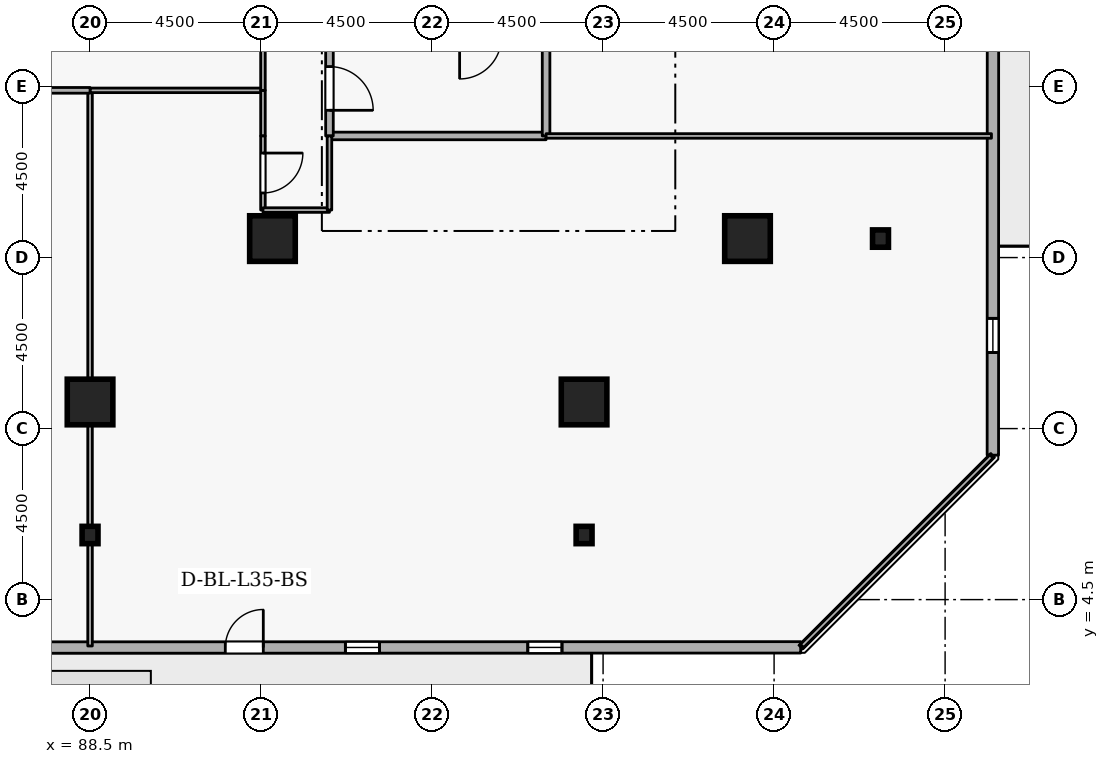
"""IFC4 building model, lengths in metres.
Left out: names, types, materials, properties, quantities, classifications, styles, units other than length and angle.
Written with IfcOpenShell. Run it as: python <this file> out.ifc"""

import sys

from ifc_helpers import new_model, si_unit, direction, frame, frame_2d, origin, origin_2d, place, context, subcontext, project, spatial, rectangle, i_section, extrude, element, fill, save


model = new_model("IFC4")
c1 = context("Model", 3, precision=1e-05, world=origin(), true_north=direction((0.0, 1.0)))
c2 = subcontext(c1, "Body", "Model", "MODEL_VIEW")
j1 = project(units=[si_unit("LENGTHUNIT", "METRE"), si_unit("PLANEANGLEUNIT", "RADIAN")], contexts=[c1])
p1 = place(None, origin())
s1 = spatial("IfcSite", under=j1, at=p1, CompositionType="ELEMENT")
p2 = place(p1, origin())
s2 = spatial("IfcBuilding", under=s1, at=p2, CompositionType="ELEMENT")
p3 = place(p2, frame((0.0, 0.0, 134.1)))
s3 = spatial("IfcBuildingStorey", under=s2, at=p3, CompositionType="ELEMENT", Elevation=134.1)
for number, where, z_axis, x_axis in (
    (1, (105.8, 14.0, 0.0), (0.0, 0.0, 1.0), (1.0, 0.0, 0.0)),
    (2, (101.5, 9.7, 0.0), (0.0, 0.0, 1.0), (1.0, 0.0, 0.0)),
    (3, (88.5, 9.7, 0.0), (0.0, 0.0, 1.0), (1.0, 0.0, 0.0)),
    (4, (93.3, 14.0, 0.0), (0.0, 0.0, 1.0), (1.0, 0.0, 0.0)),
):
    element("IfcColumn", number, at=place(p3, frame(where, z_axis=z_axis, x_axis=x_axis)), inside=s3, PredefinedType="COLUMN", context=c2, shape_type="SweptSolid", body=[
        extrude(rectangle(XDim=1.2, YDim=1.2, at=origin_2d()), origin(), (0.0, 0.0, 1.0), 3.6),
    ])
for number, where, z_axis, x_axis in (
    (5, (109.3, 14.0, 0.0), (0.0, 0.0, 1.0), (1.0, 0.0, 0.0)),
    (6, (101.5, 6.2, 0.0), (0.0, 0.0, 1.0), (1.0, 0.0, 0.0)),
    (7, (88.5, 6.2, 0.0), (0.0, 0.0, 1.0), (1.0, 0.0, 0.0)),
):
    element("IfcColumn", number, at=place(p3, frame(where, z_axis=z_axis, x_axis=x_axis)), inside=s3, PredefinedType="COLUMN", context=c2, shape_type="SweptSolid", body=[
        extrude(i_section(OverallWidth=0.418, OverallDepth=0.456, WebThickness=0.042, FlangeThickness=0.067, FilletRadius=0.015, at=origin_2d()), origin(), (0.0, 0.0, 1.0), 3.6),
    ])
p4 = place(p3, frame((73.319, 3.235, 0.0), z_axis=(0.0, 0.0, 1.0), x_axis=(0.999999969988, 0.000244999128, 0.0)))
e8 = element("IfcWall", 8, at=p4, inside=s3, PredefinedType="STANDARD", context=c2, shape_type="SweptSolid", body=[
    extrude(rectangle(XDim=33.881, YDim=0.3, at=frame_2d((16.94, 0.0))), origin(), (0.0, 0.0, 1.0), 2.7),
])
p5 = place(p4, frame((18.74, 0.0, 0.0)))
e9 = element("IfcOpeningElement", 9, at=p5, cuts=e8, PredefinedType="OPENING", context=c2, shape_type="SweptSolid", body=[
    extrude(rectangle(XDim=1.0, YDim=2.08, at=frame_2d((0.5, 1.04))), frame((0.0, 0.16, 0.0), z_axis=(0.0, -1.0, 0.0), x_axis=(1.0, 0.0, 0.0)), (0.0, 0.0, 1.0), 0.32),
])
p6 = place(p4, frame((2.7, 0.0, 0.72)))
e10 = element("IfcOpeningElement", 10, at=p6, cuts=e8, PredefinedType="OPENING", context=c2, shape_type="SweptSolid", body=[
    extrude(rectangle(XDim=0.9, YDim=1.75, at=frame_2d((0.45, 0.875))), frame((0.0, 0.16, 0.0), z_axis=(0.0, -1.0, 0.0), x_axis=(1.0, 0.0, 0.0)), (0.0, 0.0, 1.0), 0.32),
])
p7 = place(p4, frame((7.5, 0.0, 0.72)))
e11 = element("IfcOpeningElement", 11, at=p7, cuts=e8, PredefinedType="OPENING", context=c2, shape_type="SweptSolid", body=[
    extrude(rectangle(XDim=0.9, YDim=1.75, at=frame_2d((0.45, 0.875))), frame((0.0, 0.16, 0.0), z_axis=(0.0, -1.0, 0.0), x_axis=(1.0, 0.0, 0.0)), (0.0, 0.0, 1.0), 0.32),
])
p8 = place(p4, frame((12.3, 0.0, 0.72)))
e12 = element("IfcOpeningElement", 12, at=p8, cuts=e8, PredefinedType="OPENING", context=c2, shape_type="SweptSolid", body=[
    extrude(rectangle(XDim=0.9, YDim=1.75, at=frame_2d((0.45, 0.875))), frame((0.0, 0.16, 0.0), z_axis=(0.0, -1.0, 0.0), x_axis=(1.0, 0.0, 0.0)), (0.0, 0.0, 1.0), 0.32),
])
p9 = place(p4, frame((21.9, 0.0, 0.72)))
e13 = element("IfcOpeningElement", 13, at=p9, cuts=e8, PredefinedType="OPENING", context=c2, shape_type="SweptSolid", body=[
    extrude(rectangle(XDim=0.9, YDim=1.75, at=frame_2d((0.45, 0.875))), frame((0.0, 0.16, 0.0), z_axis=(0.0, -1.0, 0.0), x_axis=(1.0, 0.0, 0.0)), (0.0, 0.0, 1.0), 0.32),
])
p10 = place(p4, frame((26.7, 0.0, 0.72)))
e14 = element("IfcOpeningElement", 14, at=p10, cuts=e8, PredefinedType="OPENING", context=c2, shape_type="SweptSolid", body=[
    extrude(rectangle(XDim=0.9, YDim=1.75, at=frame_2d((0.45, 0.875))), frame((0.0, 0.16, 0.0), z_axis=(0.0, -1.0, 0.0), x_axis=(1.0, 0.0, 0.0)), (0.0, 0.0, 1.0), 0.32),
])
p11 = place(p3, frame((112.256, 8.301, 0.0), z_axis=(0.0, 0.0, 1.0), x_axis=(0.000244999128, 0.999999969988, 0.0)))
e15 = element("IfcWall", 15, at=p11, inside=s3, PredefinedType="STANDARD", context=c2, shape_type="SweptSolid", body=[
    extrude(rectangle(XDim=33.881, YDim=0.3, at=frame_2d((16.94, 0.0))), origin(), (0.0, 0.0, 1.0), 2.7),
])
p12 = place(p11, frame((26.84, 0.0, 0.0)))
e16 = element("IfcOpeningElement", 16, at=p12, cuts=e15, PredefinedType="OPENING", context=c2, shape_type="SweptSolid", body=[
    extrude(rectangle(XDim=1.0, YDim=2.08, at=frame_2d((0.5, 1.04))), frame((0.0, 0.16, 0.0), z_axis=(0.0, -1.0, 0.0), x_axis=(1.0, 0.0, 0.0)), (0.0, 0.0, 1.0), 0.32),
])
p13 = place(p11, frame((2.7, 0.0, 0.72)))
e17 = element("IfcOpeningElement", 17, at=p13, cuts=e15, PredefinedType="OPENING", context=c2, shape_type="SweptSolid", body=[
    extrude(rectangle(XDim=0.9, YDim=1.75, at=frame_2d((0.45, 0.875))), frame((0.0, 0.16, 0.0), z_axis=(0.0, -1.0, 0.0), x_axis=(1.0, 0.0, 0.0)), (0.0, 0.0, 1.0), 0.32),
])
p14 = place(p11, frame((12.3, 0.0, 0.72)))
e18 = element("IfcOpeningElement", 18, at=p14, cuts=e15, PredefinedType="OPENING", context=c2, shape_type="SweptSolid", body=[
    extrude(rectangle(XDim=0.9, YDim=1.75, at=frame_2d((0.45, 0.875))), frame((0.0, 0.16, 0.0), z_axis=(0.0, -1.0, 0.0), x_axis=(1.0, 0.0, 0.0)), (0.0, 0.0, 1.0), 0.32),
])
p15 = place(p11, frame((17.1, 0.0, 0.72)))
e19 = element("IfcOpeningElement", 19, at=p15, cuts=e15, PredefinedType="OPENING", context=c2, shape_type="SweptSolid", body=[
    extrude(rectangle(XDim=0.9, YDim=1.75, at=frame_2d((0.45, 0.875))), frame((0.0, 0.16, 0.0), z_axis=(0.0, -1.0, 0.0), x_axis=(1.0, 0.0, 0.0)), (0.0, 0.0, 1.0), 0.32),
])
p16 = place(p11, frame((21.9, 0.0, 0.72)))
e20 = element("IfcOpeningElement", 20, at=p16, cuts=e15, PredefinedType="OPENING", context=c2, shape_type="SweptSolid", body=[
    extrude(rectangle(XDim=0.9, YDim=1.75, at=frame_2d((0.45, 0.875))), frame((0.0, 0.16, 0.0), z_axis=(0.0, -1.0, 0.0), x_axis=(1.0, 0.0, 0.0)), (0.0, 0.0, 1.0), 0.32),
])
p17 = place(p3, frame((94.8, 16.7, 0.0), z_axis=(0.0, 0.0, 1.0), x_axis=(1.0, 0.0, 0.0)))
e21 = element("IfcWall", 21, at=p17, inside=s3, PredefinedType="STANDARD", context=c2, shape_type="SweptSolid", body=[
    extrude(rectangle(XDim=5.7, YDim=0.2, at=frame_2d((2.85, 0.0))), origin(), (0.0, 0.0, 1.0), 3.34),
])
p18 = place(p3, frame((100.5, 16.7, 0.0), z_axis=(0.0, 0.0, 1.0), x_axis=(0.0, 1.0, 0.0)))
e22 = element("IfcWall", 22, at=p18, inside=s3, PredefinedType="STANDARD", context=c2, shape_type="SweptSolid", body=[
    extrude(rectangle(XDim=2.5, YDim=0.2, at=frame_2d((1.25, 0.0))), origin(), (0.0, 0.0, 1.0), 3.34),
])
p19 = place(p3, frame((94.8, 19.2, 0.0), z_axis=(0.0, 0.0, 1.0), x_axis=(0.0, -1.0, 0.0)))
e23 = element("IfcWall", 23, at=p19, inside=s3, PredefinedType="STANDARD", context=c2, shape_type="SweptSolid", body=[
    extrude(rectangle(XDim=2.5, YDim=0.2, at=frame_2d((1.25, 0.0))), origin(), (0.0, 0.0, 1.0), 3.34),
])
p20 = place(p19, frame((0.675, 0.0, 0.0)))
e24 = element("IfcOpeningElement", 24, at=p20, cuts=e23, PredefinedType="OPENING", context=c2, shape_type="SweptSolid", body=[
    extrude(rectangle(XDim=1.15, YDim=2.1, at=frame_2d((0.575, 1.05))), frame((0.0, 0.11, 0.0), z_axis=(0.0, -1.0, 0.0), x_axis=(1.0, 0.0, 0.0)), (0.0, 0.0, 1.0), 0.22),
])
p21 = place(p3, frame((88.5, 3.28, 0.0), z_axis=(0.0, 0.0, 1.0), x_axis=(0.0, 1.0, 0.0)))
e25 = element("IfcWall", 25, at=p21, inside=s3, PredefinedType="PARTITIONING", context=c2, shape_type="SweptSolid", body=[
    extrude(rectangle(XDim=14.62, YDim=0.12, at=frame_2d((7.31, 0.0))), origin(), (0.0, 0.0, 1.0), 2.878),
])
p22 = place(p3, frame((88.5, 17.9, 0.0), z_axis=(0.0, 0.0, 1.0), x_axis=(1.0, 0.0, 0.0)))
e26 = element("IfcWall", 26, at=p22, inside=s3, PredefinedType="PARTITIONING", context=c2, shape_type="SweptSolid", body=[
    extrude(rectangle(XDim=4.55, YDim=0.12, at=frame_2d((2.275, 0.0))), origin(), (0.0, 0.0, 1.0), 3.34),
])
p23 = place(p3, frame((93.05, 17.9, 0.0), z_axis=(0.0, 0.0, 1.0), x_axis=(0.0, -1.0, 0.0)))
e27 = element("IfcWall", 27, at=p23, inside=s3, PredefinedType="PARTITIONING", context=c2, shape_type="SweptSolid", body=[
    extrude(rectangle(XDim=1.2, YDim=0.12, at=frame_2d((0.6, 0.0))), origin(), (0.0, 0.0, 1.0), 3.34),
])
p24 = place(p3, frame((93.05, 16.7, 0.0), z_axis=(0.0, 0.0, 1.0), x_axis=(0.0, -1.0, 0.0)))
e28 = element("IfcWall", 28, at=p24, inside=s3, PredefinedType="PARTITIONING", context=c2, shape_type="SweptSolid", body=[
    extrude(rectangle(XDim=1.95, YDim=0.12, at=frame_2d((0.975, 0.0))), origin(), (0.0, 0.0, 1.0), 3.34),
])
p25 = place(p24, frame((0.45, 0.0, 0.0)))
e29 = element("IfcOpeningElement", 29, at=p25, cuts=e28, PredefinedType="OPENING", context=c2, shape_type="SweptSolid", body=[
    extrude(rectangle(XDim=1.05, YDim=2.1, at=frame_2d((0.525, 1.05))), frame((0.0, 0.07, 0.0), z_axis=(0.0, -1.0, 0.0), x_axis=(1.0, 0.0, 0.0)), (0.0, 0.0, 1.0), 0.14),
])
p26 = place(p3, frame((93.05, 14.75, 0.0), z_axis=(0.0, 0.0, 1.0), x_axis=(1.0, 0.0, 0.0)))
e30 = element("IfcWall", 30, at=p26, inside=s3, PredefinedType="PARTITIONING", context=c2, shape_type="SweptSolid", body=[
    extrude(rectangle(XDim=1.75, YDim=0.12, at=frame_2d((0.875, 0.0))), origin(), (0.0, 0.0, 1.0), 3.34),
])
p27 = place(p3, frame((94.8, 14.75, 0.0), z_axis=(0.0, 0.0, 1.0), x_axis=(0.0, 1.0, 0.0)))
e31 = element("IfcWall", 31, at=p27, inside=s3, PredefinedType="PARTITIONING", context=c2, shape_type="SweptSolid", body=[
    extrude(rectangle(XDim=1.95, YDim=0.12, at=frame_2d((0.975, 0.0))), origin(), (0.0, 0.0, 1.0), 3.34),
])
p28 = place(p3, frame((100.5, 16.7, 0.0), z_axis=(0.0, 0.0, 1.0), x_axis=(1.0, 0.0, 0.0)))
e32 = element("IfcWall", 32, at=p28, inside=s3, PredefinedType="PARTITIONING", context=c2, shape_type="SweptSolid", body=[
    extrude(rectangle(XDim=11.72, YDim=0.12, at=frame_2d((5.86, 0.0))), origin(), (0.0, 0.0, 1.0), 3.34),
])
p29 = place(p3, frame((112.22, 8.267, 0.0), z_axis=(0.0, 0.0, 1.0), x_axis=(-0.707106781187, -0.707106781187, 0.0)))
e33 = element("IfcWall", 33, at=p29, inside=s3, PredefinedType="PARTITIONING", context=c2, shape_type="SweptSolid", body=[
    extrude(rectangle(XDim=7.052, YDim=0.12, at=frame_2d((3.526, 0.0))), origin(), (0.0, 0.0, 1.0), 3.34),
])
p30 = place(p3, frame((83.95, 17.9, 0.0), z_axis=(0.0, 0.0, 1.0), x_axis=(1.0, 0.0, 0.0)))
e34 = element("IfcWall", 34, at=p30, inside=s3, PredefinedType="PARTITIONING", context=c2, shape_type="SweptSolid", body=[
    extrude(rectangle(XDim=4.55, YDim=0.15, at=frame_2d((2.275, 0.0))), origin(), (0.0, 0.0, 1.0), 3.34),
])
p31 = place(p3, frame((93.05, 22.4, 0.0), z_axis=(0.0, 0.0, 1.0), x_axis=(0.0, -1.0, 0.0)))
e35 = element("IfcWall", 35, at=p31, inside=s3, PredefinedType="PARTITIONING", context=c2, shape_type="SweptSolid", body=[
    extrude(rectangle(XDim=4.5, YDim=0.12, at=frame_2d((2.25, 0.0))), origin(), (0.0, 0.0, 1.0), 3.34),
])
p32 = place(p5, origin())
e36 = element("IfcDoor", 36, at=p32, inside=s3, OperationType="SINGLE_SWING_RIGHT", PredefinedType="DOOR", context=c2, shape_type="SweptSolid", body=[
    extrude(rectangle(XDim=1.0, YDim=2.08, at=frame_2d((0.5, 1.04))), frame((0.0, 0.025, 0.0), z_axis=(0.0, -1.0, 0.0), x_axis=(1.0, 0.0, 0.0)), (0.0, 0.0, 1.0), 0.05),
])
fill(e9, e36)
p33 = place(p9, origin())
e37 = element("IfcWindow", 37, at=p33, inside=s3, PartitioningType="SINGLE_PANEL", PredefinedType="WINDOW", context=c2, shape_type="SweptSolid", body=[
    extrude(rectangle(XDim=0.9, YDim=1.75, at=frame_2d((0.45, 0.875))), frame((0.0, 0.03, 0.0), z_axis=(0.0, -1.0, 0.0), x_axis=(1.0, 0.0, 0.0)), (0.0, 0.0, 1.0), 0.06),
])
fill(e13, e37)
p34 = place(p10, origin())
e38 = element("IfcWindow", 38, at=p34, inside=s3, PartitioningType="SINGLE_PANEL", PredefinedType="WINDOW", context=c2, shape_type="SweptSolid", body=[
    extrude(rectangle(XDim=0.9, YDim=1.75, at=frame_2d((0.45, 0.875))), frame((0.0, 0.03, 0.0), z_axis=(0.0, -1.0, 0.0), x_axis=(1.0, 0.0, 0.0)), (0.0, 0.0, 1.0), 0.06),
])
fill(e14, e38)
p35 = place(p13, origin())
e39 = element("IfcWindow", 39, at=p35, inside=s3, PartitioningType="SINGLE_PANEL", PredefinedType="WINDOW", context=c2, shape_type="SweptSolid", body=[
    extrude(rectangle(XDim=0.9, YDim=1.75, at=frame_2d((0.45, 0.875))), frame((0.0, 0.03, 0.0), z_axis=(0.0, -1.0, 0.0), x_axis=(1.0, 0.0, 0.0)), (0.0, 0.0, 1.0), 0.06),
])
fill(e17, e39)
p36 = place(p20, origin())
e40 = element("IfcDoor", 40, at=p36, inside=s3, OperationType="SINGLE_SWING_RIGHT", PredefinedType="DOOR", context=c2, shape_type="SweptSolid", body=[
    extrude(rectangle(XDim=1.15, YDim=2.1, at=frame_2d((0.575, 1.05))), frame((0.0, 0.025, 0.0), z_axis=(0.0, -1.0, 0.0), x_axis=(1.0, 0.0, 0.0)), (0.0, 0.0, 1.0), 0.05),
])
fill(e24, e40)
p37 = place(p25, origin())
e41 = element("IfcDoor", 41, at=p37, inside=s3, OperationType="SINGLE_SWING_LEFT", PredefinedType="DOOR", context=c2, shape_type="SweptSolid", body=[
    extrude(rectangle(XDim=1.05, YDim=2.1, at=frame_2d((0.525, 1.05))), frame((0.0, 0.025, 0.0), z_axis=(0.0, -1.0, 0.0), x_axis=(1.0, 0.0, 0.0)), (0.0, 0.0, 1.0), 0.05),
])
fill(e29, e41)
save(model, sys.argv[1])
